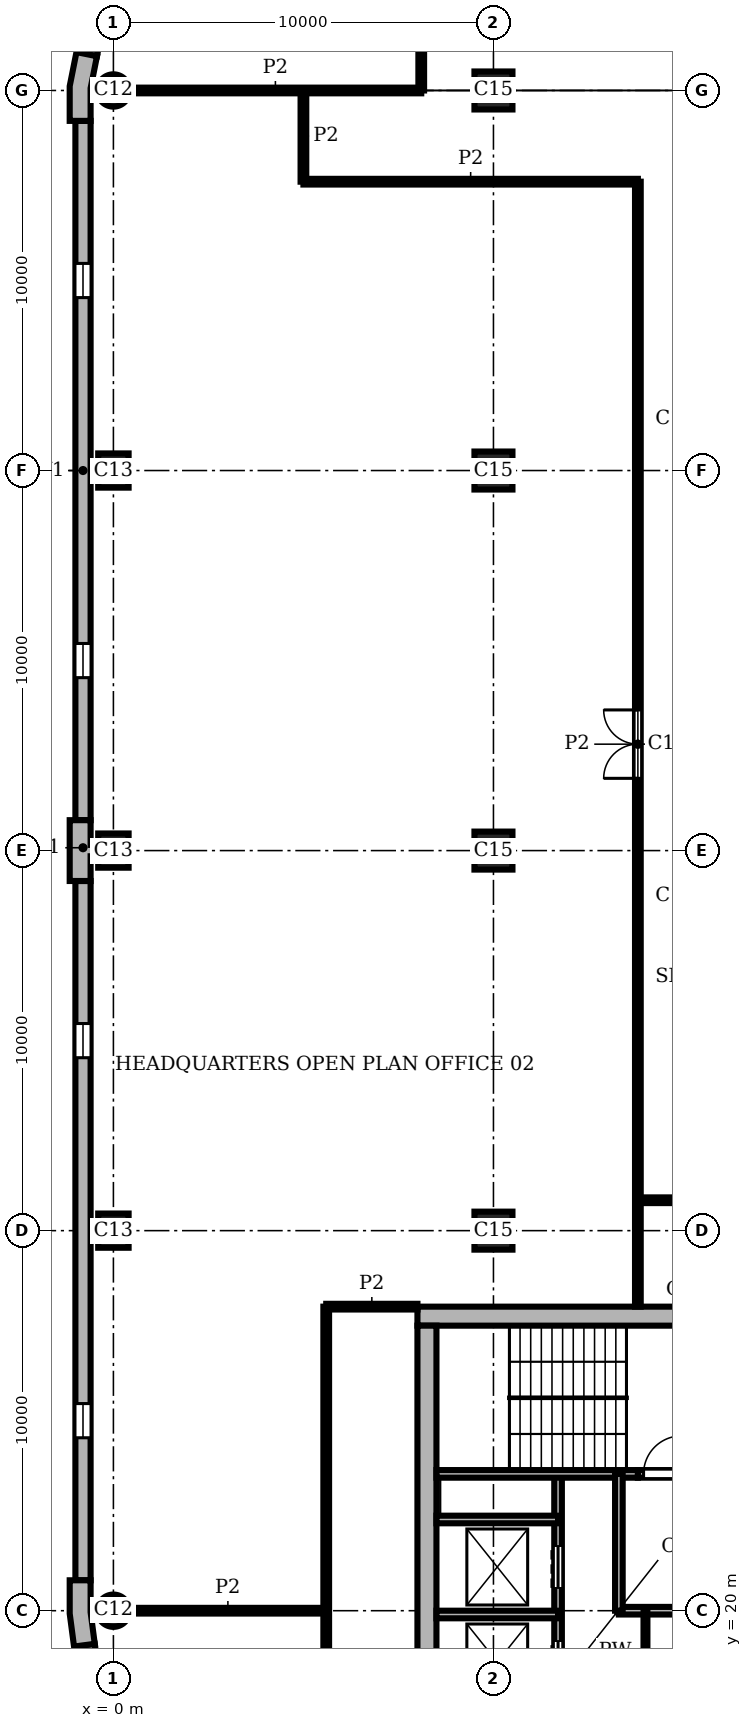
"""IFC4 building model, lengths in metres.
Left out: names, types, materials, properties, quantities, classifications, styles, units other than length and angle.
Written with IfcOpenShell. Run it as: python <this file> out.ifc"""

import sys

from ifc_helpers import new_model, si_unit, direction, frame, frame_2d, origin, origin_2d, place, context, subcontext, project, spatial, polyline, rectangle, circle, outline, extrude, element, fill, save


model = new_model("IFC4")
c1 = context("Model", 3, precision=1e-05, world=origin(), true_north=direction((0.0, 1.0)))
c2 = subcontext(c1, "Body", "Model", "MODEL_VIEW")
j1 = project(units=[si_unit("LENGTHUNIT", "METRE"), si_unit("PLANEANGLEUNIT", "RADIAN")], contexts=[c1])
p1 = place(None, origin())
s1 = spatial("IfcSite", under=j1, at=p1, CompositionType="ELEMENT")
p2 = place(p1, origin())
s2 = spatial("IfcBuilding", under=s1, at=p2, CompositionType="ELEMENT")
p3 = place(p2, frame((0.0, 0.0, 341.1)))
s3 = spatial("IfcBuildingStorey", under=s2, at=p3, CompositionType="ELEMENT", Elevation=341.1)
p4 = place(p3, frame((0.0, 60.0, 0.0), z_axis=(0.0, 0.0, 1.0), x_axis=(1.0, 0.0, 0.0)))
e1 = element("IfcColumn", 1, at=p4, inside=s3, PredefinedType="COLUMN", context=c2, shape_type="SweptSolid", body=[
    extrude(circle(Radius=0.425, at=origin_2d()), origin(), (0.0, 0.0, 1.0), 3.9),
])
for number, where, z_axis, x_axis in (
    (2, (0.0, 50.0, 0.0), (0.0, 0.0, 1.0), (0.0, 1.0, 0.0)),
    (3, (0.0, 40.0, 0.0), (0.0, 0.0, 1.0), (0.0, 1.0, 0.0)),
    (4, (0.0, 30.0, 0.0), (0.0, 0.0, 1.0), (0.0, 1.0, 0.0)),
):
    element("IfcColumn", number, at=place(p3, frame(where, z_axis=z_axis, x_axis=x_axis)), inside=s3, PredefinedType="COLUMN", context=c2, shape_type="SweptSolid", body=[
        extrude(rectangle(XDim=0.9, YDim=0.8, at=origin_2d()), origin(), (0.0, 0.0, 1.0), 3.9),
    ])
p5 = place(p3, frame((0.0, 20.0, 0.0), z_axis=(0.0, 0.0, 1.0), x_axis=(1.0, 0.0, 0.0)))
e5 = element("IfcColumn", 5, at=p5, inside=s3, PredefinedType="COLUMN", context=c2, shape_type="SweptSolid", body=[
    extrude(circle(Radius=0.425, at=origin_2d()), origin(), (0.0, 0.0, 1.0), 3.9),
])
for number, where, z_axis, x_axis in (
    (6, (10.0, 30.0, 0.0), (0.0, 0.0, 1.0), (1.0, 0.0, 0.0)),
    (7, (10.0, 40.0, 0.0), (0.0, 0.0, 1.0), (1.0, 0.0, 0.0)),
    (8, (10.0, 50.0, 0.0), (0.0, 0.0, 1.0), (1.0, 0.0, 0.0)),
    (9, (10.0, 60.0, 0.0), (0.0, 0.0, 1.0), (1.0, 0.0, 0.0)),
):
    element("IfcColumn", number, at=place(p3, frame(where, z_axis=z_axis, x_axis=x_axis)), inside=s3, PredefinedType="COLUMN", context=c2, shape_type="SweptSolid", body=[
        extrude(rectangle(XDim=1.0, YDim=1.0, at=origin_2d()), origin(), (0.0, 0.0, 1.0), 3.9),
    ])
p6 = place(p3, frame((28.0, 27.75, 0.0), z_axis=(0.0, 0.0, 1.0), x_axis=(-1.0, 0.0, 0.0)))
e10 = element("IfcWall", 10, at=p6, inside=s3, PredefinedType="SHEAR", context=c2, shape_type="SweptSolid", body=[
    extrude(rectangle(XDim=20.0, YDim=0.5, at=frame_2d((10.0, 0.0))), origin(), (0.0, 0.0, 1.0), 3.9),
])
p7 = place(p3, frame((8.25, 27.5, 0.0), z_axis=(0.0, 0.0, 1.0), x_axis=(0.0, -1.0, 0.0)))
e11 = element("IfcWall", 11, at=p7, inside=s3, PredefinedType="SHEAR", context=c2, shape_type="SweptSolid", body=[
    extrude(rectangle(XDim=19.0, YDim=0.5, at=frame_2d((9.5, 0.0))), origin(), (0.0, 0.0, 1.0), 3.9),
])
p8 = place(p3, origin())
e12 = element("IfcWall", 12, at=p8, inside=s3, PredefinedType="SOLIDWALL", context=c2, shape_type="SweptSolid", body=[
    extrude(outline(polyline([(-0.825, 60.98), (-0.972, 61.009), (-1.15, 60.113), (-1.15, 59.2), (-1.0, 59.2), (-0.6, 59.2), (-0.6, 60.059), (-0.432, 60.902), (-0.825, 60.98)])), origin(), (0.0, 0.0, 1.0), 3.9),
])
e13 = element("IfcWall", 13, at=p8, inside=s3, PredefinedType="SOLIDWALL", context=c2, shape_type="SweptSolid", body=[
    extrude(outline(polyline([(-0.6, 39.2), (-0.6, 39.85), (-0.45, 39.85), (-0.45, 40.15), (-0.6, 40.15), (-0.6, 40.8), (-1.0, 40.8), (-1.15, 40.8), (-1.15, 40.0), (-1.15, 39.2), (-1.0, 39.2), (-0.6, 39.2)])), origin(), (0.0, 0.0, 1.0), 3.9),
])
e14 = element("IfcWall", 14, at=p8, inside=s3, PredefinedType="SOLIDWALL", context=c2, shape_type="SweptSolid", body=[
    extrude(outline(polyline([(-1.0, 20.8), (-1.15, 20.8), (-1.15, 19.925), (-1.036, 19.057), (-0.887, 19.076), (-0.49, 19.128), (-0.6, 19.961), (-0.6, 20.8), (-1.0, 20.8)])), origin(), (0.0, 0.0, 1.0), 3.9),
])
p9 = place(p3, frame((0.299, 65.602, 0.0), z_axis=(0.0, 0.0, 1.0), x_axis=(-0.195098533057, -0.98078364709, 0.0)))
e15 = element("IfcWall", 15, at=p9, inside=s3, PredefinedType="SOLIDWALL", context=c2, shape_type="SweptSolid", body=[
    extrude(rectangle(XDim=4.753, YDim=0.4, at=frame_2d((2.376, 0.0))), origin(), (0.0, 0.0, 1.0), 3.9),
])
p10 = place(p9, frame((0.226, 0.0, 0.9)))
e16 = element("IfcOpeningElement", 16, at=p10, cuts=e15, PredefinedType="OPENING", context=c2, shape_type="SweptSolid", body=[
    extrude(rectangle(XDim=4.3, YDim=2.35, at=frame_2d((2.15, 1.175))), frame((0.0, 0.21, 0.0), z_axis=(0.0, -1.0, 0.0), x_axis=(1.0, 0.0, 0.0)), (0.0, 0.0, 1.0), 0.42),
])
p11 = place(p3, frame((-0.8, 59.2, 0.0), z_axis=(0.0, 0.0, 1.0), x_axis=(0.0, -1.0, 0.0)))
e17 = element("IfcWall", 17, at=p11, inside=s3, PredefinedType="SOLIDWALL", context=c2, shape_type="SweptSolid", body=[
    extrude(rectangle(XDim=18.4, YDim=0.4, at=frame_2d((9.2, 0.0))), origin(), (0.0, 0.0, 1.0), 3.9),
])
p12 = place(p11, frame((3.75, 0.0, 0.9)))
e18 = element("IfcOpeningElement", 18, at=p12, cuts=e17, PredefinedType="OPENING", context=c2, shape_type="SweptSolid", body=[
    extrude(rectangle(XDim=0.9, YDim=2.35, at=frame_2d((0.45, 1.175))), frame((0.0, 0.21, 0.0), z_axis=(0.0, -1.0, 0.0), x_axis=(1.0, 0.0, 0.0)), (0.0, 0.0, 1.0), 0.42),
])
p13 = place(p11, frame((13.75, 0.0, 0.9)))
e19 = element("IfcOpeningElement", 19, at=p13, cuts=e17, PredefinedType="OPENING", context=c2, shape_type="SweptSolid", body=[
    extrude(rectangle(XDim=0.9, YDim=2.35, at=frame_2d((0.45, 1.175))), frame((0.0, 0.21, 0.0), z_axis=(0.0, -1.0, 0.0), x_axis=(1.0, 0.0, 0.0)), (0.0, 0.0, 1.0), 0.42),
])
p14 = place(p3, frame((-0.8, 39.2, 0.0), z_axis=(0.0, 0.0, 1.0), x_axis=(0.0, -1.0, 0.0)))
e20 = element("IfcWall", 20, at=p14, inside=s3, PredefinedType="SOLIDWALL", context=c2, shape_type="SweptSolid", body=[
    extrude(rectangle(XDim=18.4, YDim=0.4, at=frame_2d((9.2, 0.0))), origin(), (0.0, 0.0, 1.0), 3.9),
])
p15 = place(p14, frame((3.75, 0.0, 0.9)))
e21 = element("IfcOpeningElement", 21, at=p15, cuts=e20, PredefinedType="OPENING", context=c2, shape_type="SweptSolid", body=[
    extrude(rectangle(XDim=0.9, YDim=2.35, at=frame_2d((0.45, 1.175))), frame((0.0, 0.21, 0.0), z_axis=(0.0, -1.0, 0.0), x_axis=(1.0, 0.0, 0.0)), (0.0, 0.0, 1.0), 0.42),
])
p16 = place(p14, frame((13.75, 0.0, 0.9)))
e22 = element("IfcOpeningElement", 22, at=p16, cuts=e20, PredefinedType="OPENING", context=c2, shape_type="SweptSolid", body=[
    extrude(rectangle(XDim=0.9, YDim=2.35, at=frame_2d((0.45, 1.175))), frame((0.0, 0.21, 0.0), z_axis=(0.0, -1.0, 0.0), x_axis=(1.0, 0.0, 0.0)), (0.0, 0.0, 1.0), 0.42),
])
p17 = place(p3, frame((-0.689, 19.102, 0.0), z_axis=(0.0, 0.0, 1.0), x_axis=(0.130514280502, -0.991446429508, 0.0)))
e23 = element("IfcWall", 23, at=p17, inside=s3, PredefinedType="SOLIDWALL", context=c2, shape_type="SweptSolid", body=[
    extrude(rectangle(XDim=4.121, YDim=0.4, at=frame_2d((2.061, 0.0))), origin(), (0.0, 0.0, 1.0), 3.9),
])
p18 = place(p17, frame((1.611, 0.0, 0.9)))
e24 = element("IfcOpeningElement", 24, at=p18, cuts=e23, PredefinedType="OPENING", context=c2, shape_type="SweptSolid", body=[
    extrude(rectangle(XDim=0.9, YDim=2.35, at=frame_2d((0.45, 1.175))), frame((0.0, 0.21, 0.0), z_axis=(0.0, -1.0, 0.0), x_axis=(1.0, 0.0, 0.0)), (0.0, 0.0, 1.0), 0.42),
])
p19 = place(p3, frame((8.5, 19.9, 0.0), z_axis=(0.0, 0.0, 1.0), x_axis=(1.0, 0.0, 0.0)))
e25 = element("IfcWall", 25, at=p19, inside=s3, PredefinedType="SHEAR", context=c2, shape_type="SweptSolid", body=[
    extrude(rectangle(XDim=3.2, YDim=0.2, at=frame_2d((1.6, 0.0))), origin(), (0.0, 0.0, 1.0), 3.58),
])
p20 = place(p3, frame((13.3, 20.0, 0.0), z_axis=(0.0, 0.0, 1.0), x_axis=(1.0, 0.0, 0.0)))
e26 = element("IfcWall", 26, at=p20, inside=s3, PredefinedType="SHEAR", context=c2, shape_type="SweptSolid", body=[
    extrude(rectangle(XDim=4.7, YDim=0.2, at=frame_2d((2.35, 0.0))), origin(), (0.0, 0.0, 1.0), 3.58),
])
p21 = place(p3, frame((8.5, 22.4, 0.0), z_axis=(0.0, 0.0, 1.0), x_axis=(1.0, 0.0, 0.0)))
e27 = element("IfcWall", 27, at=p21, inside=s3, PredefinedType="SHEAR", context=c2, shape_type="SweptSolid", body=[
    extrude(rectangle(XDim=3.2, YDim=0.2, at=frame_2d((1.6, 0.0))), origin(), (0.0, 0.0, 1.0), 3.58),
])
p22 = place(p3, frame((8.5, 23.6, 0.0), z_axis=(0.0, 0.0, 1.0), x_axis=(1.0, 0.0, 0.0)))
e28 = element("IfcWall", 28, at=p22, inside=s3, PredefinedType="SHEAR", context=c2, shape_type="SweptSolid", body=[
    extrude(rectangle(XDim=5.3, YDim=0.2, at=frame_2d((2.65, 0.0))), origin(), (0.0, 0.0, 1.0), 3.58),
])
p23 = place(p3, frame((13.8, 23.6, 0.0), z_axis=(0.0, 0.0, 1.0), x_axis=(1.0, 0.0, 0.0)))
e29 = element("IfcWall", 29, at=p23, inside=s3, PredefinedType="SHEAR", context=c2, shape_type="SweptSolid", body=[
    extrude(rectangle(XDim=13.7, YDim=0.2, at=frame_2d((6.85, 0.0))), origin(), (0.0, 0.0, 1.0), 3.58),
])
p24 = place(p23, frame((2.4, 0.0, 0.0)))
e30 = element("IfcOpeningElement", 30, at=p24, cuts=e29, PredefinedType="OPENING", context=c2, shape_type="SweptSolid", body=[
    extrude(rectangle(XDim=1.1, YDim=2.1, at=frame_2d((0.55, 1.05))), frame((0.0, 0.11, 0.0), z_axis=(0.0, -1.0, 0.0), x_axis=(1.0, 0.0, 0.0)), (0.0, 0.0, 1.0), 0.22),
])
p25 = place(p23, frame((4.9, 0.0, 0.0)))
e31 = element("IfcOpeningElement", 31, at=p25, cuts=e29, PredefinedType="OPENING", context=c2, shape_type="SweptSolid", body=[
    extrude(rectangle(XDim=1.1, YDim=2.1, at=frame_2d((0.55, 1.05))), frame((0.0, 0.11, 0.0), z_axis=(0.0, -1.0, 0.0), x_axis=(1.0, 0.0, 0.0)), (0.0, 0.0, 1.0), 0.22),
])
p26 = place(p23, frame((0.15, 0.0, 0.0)))
e32 = element("IfcOpeningElement", 32, at=p26, cuts=e29, PredefinedType="OPENING", context=c2, shape_type="SweptSolid", body=[
    extrude(rectangle(XDim=1.0, YDim=2.1, at=frame_2d((0.5, 1.05))), frame((0.0, 0.11, 0.0), z_axis=(0.0, -1.0, 0.0), x_axis=(1.0, 0.0, 0.0)), (0.0, 0.0, 1.0), 0.22),
])
p27 = place(p3, frame((11.7, 12.4, 0.0), z_axis=(0.0, 0.0, 1.0), x_axis=(0.0, 1.0, 0.0)))
e33 = element("IfcWall", 33, at=p27, inside=s3, PredefinedType="SHEAR", context=c2, shape_type="SweptSolid", body=[
    extrude(rectangle(XDim=11.2, YDim=0.2, at=frame_2d((5.6, 0.0))), origin(), (0.0, 0.0, 1.0), 3.58),
])
p28 = place(p27, frame((0.7, 0.0, 0.0)))
e34 = element("IfcOpeningElement", 34, at=p28, cuts=e33, PredefinedType="OPENING", context=c2, shape_type="SweptSolid", body=[
    extrude(rectangle(XDim=1.1, YDim=2.1, at=frame_2d((0.55, 1.05))), frame((0.0, 0.11, 0.0), z_axis=(0.0, -1.0, 0.0), x_axis=(1.0, 0.0, 0.0)), (0.0, 0.0, 1.0), 0.22),
])
p29 = place(p27, frame((3.2, 0.0, 0.0)))
e35 = element("IfcOpeningElement", 35, at=p29, cuts=e33, PredefinedType="OPENING", context=c2, shape_type="SweptSolid", body=[
    extrude(rectangle(XDim=1.1, YDim=2.1, at=frame_2d((0.55, 1.05))), frame((0.0, 0.11, 0.0), z_axis=(0.0, -1.0, 0.0), x_axis=(1.0, 0.0, 0.0)), (0.0, 0.0, 1.0), 0.22),
])
p30 = place(p27, frame((5.7, 0.0, 0.0)))
e36 = element("IfcOpeningElement", 36, at=p30, cuts=e33, PredefinedType="OPENING", context=c2, shape_type="SweptSolid", body=[
    extrude(rectangle(XDim=1.1, YDim=2.1, at=frame_2d((0.55, 1.05))), frame((0.0, 0.11, 0.0), z_axis=(0.0, -1.0, 0.0), x_axis=(1.0, 0.0, 0.0)), (0.0, 0.0, 1.0), 0.22),
])
p31 = place(p27, frame((8.2, 0.0, 0.0)))
e37 = element("IfcOpeningElement", 37, at=p31, cuts=e33, PredefinedType="OPENING", context=c2, shape_type="SweptSolid", body=[
    extrude(rectangle(XDim=1.1, YDim=2.1, at=frame_2d((0.55, 1.05))), frame((0.0, 0.11, 0.0), z_axis=(0.0, -1.0, 0.0), x_axis=(1.0, 0.0, 0.0)), (0.0, 0.0, 1.0), 0.22),
])
p32 = place(p3, frame((13.3, 20.0, 0.0), z_axis=(0.0, 0.0, 1.0), x_axis=(0.0, 1.0, 0.0)))
e38 = element("IfcWall", 38, at=p32, inside=s3, PredefinedType="SHEAR", context=c2, shape_type="SweptSolid", body=[
    extrude(rectangle(XDim=3.6, YDim=0.2, at=frame_2d((1.8, 0.0))), origin(), (0.0, 0.0, 1.0), 3.58),
])
p33 = place(p3, frame((14.0, 16.2, 0.0), z_axis=(0.0, 0.0, 1.0), x_axis=(0.0, 1.0, 0.0)))
e39 = element("IfcWall", 39, at=p33, inside=s3, PredefinedType="PARTITIONING", context=c2, shape_type="SweptSolid", body=[
    extrude(rectangle(XDim=3.8, YDim=0.1, at=frame_2d((1.9, 0.0))), origin(), (0.0, 0.0, 1.0), 3.58),
])
p34 = place(p3, frame((5.0, 57.6, 0.0), z_axis=(0.0, 0.0, 1.0), x_axis=(0.0, 1.0, 0.0)))
e40 = element("IfcWall", 40, at=p34, inside=s3, PredefinedType="PARTITIONING", context=c2, shape_type="SweptSolid", body=[
    extrude(rectangle(XDim=2.4, YDim=0.15, at=frame_2d((1.2, 0.0))), origin(), (0.0, 0.0, 1.0), 3.58),
])
p35 = place(p3, frame((5.6, 5.6, 0.0), z_axis=(0.0, 0.0, 1.0), x_axis=(0.0, 1.0, 0.0)))
e41 = element("IfcWall", 41, at=p35, inside=s3, PredefinedType="PARTITIONING", context=c2, shape_type="SweptSolid", body=[
    extrude(rectangle(XDim=22.4, YDim=0.15, at=frame_2d((11.2, 0.0))), origin(), (0.0, 0.0, 1.0), 3.58),
])
p36 = place(p35, frame((5.35, 0.0, 0.0)))
e42 = element("IfcOpeningElement", 42, at=p36, cuts=e41, PredefinedType="OPENING", context=c2, shape_type="SweptSolid", body=[
    extrude(rectangle(XDim=0.8, YDim=2.1, at=frame_2d((0.4, 1.05))), frame((0.0, 0.085, 0.0), z_axis=(0.0, -1.0, 0.0), x_axis=(1.0, 0.0, 0.0)), (0.0, 0.0, 1.0), 0.17),
])
p37 = place(p35, frame((11.0, 0.0, 0.0)))
e43 = element("IfcOpeningElement", 43, at=p37, cuts=e41, PredefinedType="OPENING", context=c2, shape_type="SweptSolid", body=[
    extrude(rectangle(XDim=1.1, YDim=2.1, at=frame_2d((0.55, 1.05))), frame((0.0, 0.085, 0.0), z_axis=(0.0, -1.0, 0.0), x_axis=(1.0, 0.0, 0.0)), (0.0, 0.0, 1.0), 0.17),
])
p38 = place(p3, frame((8.1, 60.0, 0.0), z_axis=(0.0, 0.0, 1.0), x_axis=(0.0, 1.0, 0.0)))
e44 = element("IfcWall", 44, at=p38, inside=s3, PredefinedType="PARTITIONING", context=c2, shape_type="SweptSolid", body=[
    extrude(rectangle(XDim=6.4, YDim=0.15, at=frame_2d((3.2, 0.0))), origin(), (0.0, 0.0, 1.0), 3.58),
])
p39 = place(p38, frame((2.35, 0.0, 0.0)))
e45 = element("IfcOpeningElement", 45, at=p39, cuts=e44, PredefinedType="OPENING", context=c2, shape_type="SweptSolid", body=[
    extrude(rectangle(XDim=1.0, YDim=2.1, at=frame_2d((0.5, 1.05))), frame((0.0, 0.085, 0.0), z_axis=(0.0, -1.0, 0.0), x_axis=(1.0, 0.0, 0.0)), (0.0, 0.0, 1.0), 0.17),
])
p40 = place(p3, frame((13.8, 28.0, 0.0), z_axis=(0.0, 0.0, 1.0), x_axis=(0.0, 1.0, 0.0)))
e46 = element("IfcWall", 46, at=p40, inside=s3, PredefinedType="PARTITIONING", context=c2, shape_type="SweptSolid", body=[
    extrude(rectangle(XDim=29.6, YDim=0.15, at=frame_2d((14.8, 0.0))), origin(), (0.0, 0.0, 1.0), 3.58),
])
p41 = place(p40, frame((13.901, 0.0, 0.0)))
e47 = element("IfcOpeningElement", 47, at=p41, cuts=e46, PredefinedType="OPENING", context=c2, shape_type="SweptSolid", body=[
    extrude(rectangle(XDim=1.8, YDim=2.1, at=frame_2d((0.9, 1.05))), frame((0.0, 0.085, 0.0), z_axis=(0.0, -1.0, 0.0), x_axis=(1.0, 0.0, 0.0)), (0.0, 0.0, 1.0), 0.17),
])
p42 = place(p3, frame((0.425, 20.0, 0.0), z_axis=(0.0, 0.0, 1.0), x_axis=(1.0, 0.0, 0.0)))
e48 = element("IfcWall", 48, at=p42, inside=s3, PredefinedType="PARTITIONING", context=c2, shape_type="SweptSolid", body=[
    extrude(rectangle(XDim=5.175, YDim=0.15, at=frame_2d((2.587, 0.0))), origin(), (0.0, 0.0, 1.0), 3.58),
])
p43 = place(p3, frame((5.6, 28.0, 0.0), z_axis=(0.0, 0.0, 1.0), x_axis=(1.0, 0.0, 0.0)))
e49 = element("IfcWall", 49, at=p43, inside=s3, PredefinedType="PARTITIONING", context=c2, shape_type="SweptSolid", body=[
    extrude(rectangle(XDim=2.4, YDim=0.15, at=frame_2d((1.2, 0.0))), origin(), (0.0, 0.0, 1.0), 3.58),
])
p44 = place(p3, frame((13.802, 30.8, 0.0), z_axis=(0.0, 0.0, 1.0), x_axis=(1.0, 0.0, 0.0)))
e50 = element("IfcWall", 50, at=p44, inside=s3, PredefinedType="PARTITIONING", context=c2, shape_type="SweptSolid", body=[
    extrude(rectangle(XDim=16.998, YDim=0.15, at=frame_2d((8.499, 0.0))), origin(), (0.0, 0.0, 1.0), 3.58),
])
p45 = place(p44, frame((9.35, 0.0, 0.0)))
e51 = element("IfcOpeningElement", 51, at=p45, cuts=e50, PredefinedType="OPENING", context=c2, shape_type="SweptSolid", body=[
    extrude(rectangle(XDim=1.0, YDim=2.1, at=frame_2d((0.5, 1.05))), frame((0.0, 0.085, 0.0), z_axis=(0.0, -1.0, 0.0), x_axis=(1.0, 0.0, 0.0)), (0.0, 0.0, 1.0), 0.17),
])
p46 = place(p3, frame((5.0, 57.6, 0.0), z_axis=(0.0, 0.0, 1.0), x_axis=(1.0, 0.0, 0.0)))
e52 = element("IfcWall", 52, at=p46, inside=s3, PredefinedType="PARTITIONING", context=c2, shape_type="SweptSolid", body=[
    extrude(rectangle(XDim=8.8, YDim=0.15, at=frame_2d((4.4, 0.0))), origin(), (0.0, 0.0, 1.0), 3.58),
])
p47 = place(p3, frame((0.425, 60.0, 0.0), z_axis=(0.0, 0.0, 1.0), x_axis=(1.0, 0.0, 0.0)))
e53 = element("IfcWall", 53, at=p47, inside=s3, PredefinedType="PARTITIONING", context=c2, shape_type="SweptSolid", body=[
    extrude(rectangle(XDim=7.675, YDim=0.15, at=frame_2d((3.837, 0.0))), origin(), (0.0, 0.0, 1.0), 3.58),
])
p48 = place(p12, origin())
e54 = element("IfcWindow", 54, at=p48, inside=s3, PartitioningType="SINGLE_PANEL", PredefinedType="WINDOW", context=c2, shape_type="SweptSolid", body=[
    extrude(rectangle(XDim=0.9, YDim=2.35, at=frame_2d((0.45, 1.175))), frame((0.0, 0.16, 0.0), z_axis=(0.0, -1.0, 0.0), x_axis=(1.0, 0.0, 0.0)), (0.0, 0.0, 1.0), 0.06),
])
fill(e18, e54)
p49 = place(p13, origin())
e55 = element("IfcWindow", 55, at=p49, inside=s3, PartitioningType="SINGLE_PANEL", PredefinedType="WINDOW", context=c2, shape_type="SweptSolid", body=[
    extrude(rectangle(XDim=0.9, YDim=2.35, at=frame_2d((0.45, 1.175))), frame((0.0, 0.16, 0.0), z_axis=(0.0, -1.0, 0.0), x_axis=(1.0, 0.0, 0.0)), (0.0, 0.0, 1.0), 0.06),
])
fill(e19, e55)
p50 = place(p15, origin())
e56 = element("IfcWindow", 56, at=p50, inside=s3, PartitioningType="SINGLE_PANEL", PredefinedType="WINDOW", context=c2, shape_type="SweptSolid", body=[
    extrude(rectangle(XDim=0.9, YDim=2.35, at=frame_2d((0.45, 1.175))), frame((0.0, 0.16, 0.0), z_axis=(0.0, -1.0, 0.0), x_axis=(1.0, 0.0, 0.0)), (0.0, 0.0, 1.0), 0.06),
])
fill(e21, e56)
p51 = place(p16, origin())
e57 = element("IfcWindow", 57, at=p51, inside=s3, PartitioningType="SINGLE_PANEL", PredefinedType="WINDOW", context=c2, shape_type="SweptSolid", body=[
    extrude(rectangle(XDim=0.9, YDim=2.35, at=frame_2d((0.45, 1.175))), frame((0.0, 0.16, 0.0), z_axis=(0.0, -1.0, 0.0), x_axis=(1.0, 0.0, 0.0)), (0.0, 0.0, 1.0), 0.06),
])
fill(e22, e57)
p52 = place(p30, origin())
e58 = element("IfcDoor", 58, at=p52, inside=s3, OperationType="DOUBLE_DOOR_SLIDING", PredefinedType="DOOR", context=c2, shape_type="SweptSolid", body=[
    extrude(rectangle(XDim=1.1, YDim=2.1, at=frame_2d((0.55, 1.05))), frame((0.0, 0.025, 0.0), z_axis=(0.0, -1.0, 0.0), x_axis=(1.0, 0.0, 0.0)), (0.0, 0.0, 1.0), 0.05),
])
fill(e36, e58)
p53 = place(p31, origin())
e59 = element("IfcDoor", 59, at=p53, inside=s3, OperationType="DOUBLE_DOOR_SLIDING", PredefinedType="DOOR", context=c2, shape_type="SweptSolid", body=[
    extrude(rectangle(XDim=1.1, YDim=2.1, at=frame_2d((0.55, 1.05))), frame((0.0, 0.025, 0.0), z_axis=(0.0, -1.0, 0.0), x_axis=(1.0, 0.0, 0.0)), (0.0, 0.0, 1.0), 0.05),
])
fill(e37, e59)
p54 = place(p26, origin())
e60 = element("IfcDoor", 60, at=p54, inside=s3, OperationType="SINGLE_SWING_RIGHT", PredefinedType="DOOR", context=c2, shape_type="SweptSolid", body=[
    extrude(rectangle(XDim=1.0, YDim=2.1, at=frame_2d((0.5, 1.05))), frame((0.0, 0.025, 0.0), z_axis=(0.0, -1.0, 0.0), x_axis=(1.0, 0.0, 0.0)), (0.0, 0.0, 1.0), 0.05),
])
fill(e32, e60)
p55 = place(p41, origin())
e61 = element("IfcDoor", 61, at=p55, inside=s3, OperationType="DOUBLE_DOOR_SINGLE_SWING", PredefinedType="DOOR", context=c2, shape_type="SweptSolid", body=[
    extrude(rectangle(XDim=1.8, YDim=2.1, at=frame_2d((0.9, 1.05))), frame((0.0, 0.025, 0.0), z_axis=(0.0, -1.0, 0.0), x_axis=(1.0, 0.0, 0.0)), (0.0, 0.0, 1.0), 0.05),
])
fill(e47, e61)
save(model, sys.argv[1])
